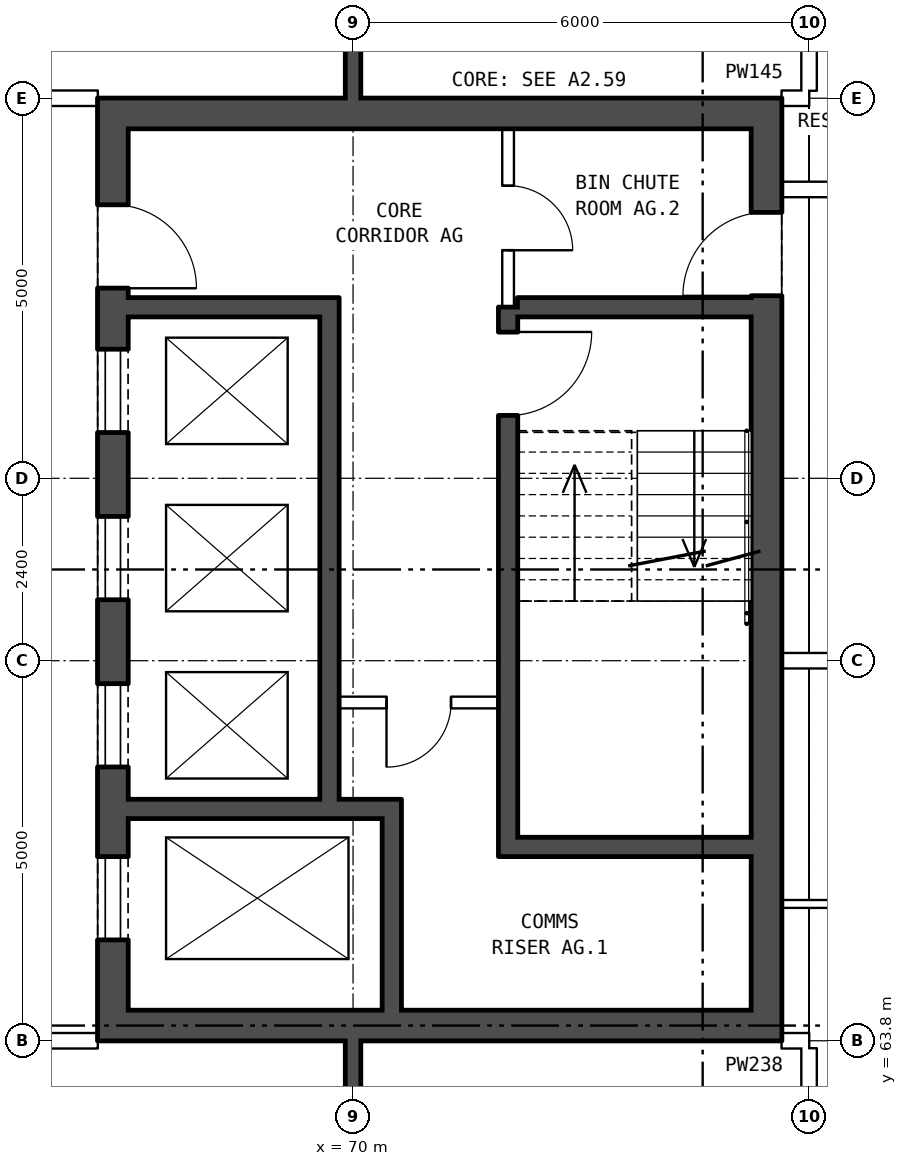
"""IFC4 building model, lengths in metres.
Left out: names, types, materials, properties, quantities, classifications, styles, units other than length and angle.
Written with IfcOpenShell. Run it as: python <this file> out.ifc"""

import sys

from ifc_helpers import new_model, si_unit, direction, frame, frame_2d, origin, place, context, subcontext, project, spatial, rectangle, extrude, element, fill, save


model = new_model("IFC4")
c1 = context("Model", 3, precision=1e-05, world=origin(), true_north=direction((0.0, 1.0)))
c2 = subcontext(c1, "Body", "Model", "MODEL_VIEW")
j1 = project(units=[si_unit("LENGTHUNIT", "METRE"), si_unit("PLANEANGLEUNIT", "RADIAN")], contexts=[c1])
p1 = place(None, origin())
s1 = spatial("IfcSite", under=j1, at=p1, CompositionType="ELEMENT")
p2 = place(p1, origin())
s2 = spatial("IfcBuilding", under=s1, at=p2, CompositionType="ELEMENT")
p3 = place(p2, frame((0.0, 0.0, 205.9)))
s3 = spatial("IfcBuildingStorey", under=s2, at=p3, CompositionType="ELEMENT", Elevation=205.9)
p4 = place(p3, frame((66.84, 63.8, 0.0), z_axis=(0.0, 0.0, 1.0), x_axis=(0.0, 1.0, 0.0)))
e1 = element("IfcWall", 1, at=p4, inside=s3, PredefinedType="SHEAR", context=c2, shape_type="SweptSolid", body=[
    extrude(rectangle(XDim=12.4, YDim=0.4, at=frame_2d((6.2, 0.0))), origin(), (0.0, 0.0, 1.0), 2.85),
])
p5 = place(p4, frame((1.325, 0.0, 0.0)))
e2 = element("IfcOpeningElement", 2, at=p5, cuts=e1, PredefinedType="OPENING", context=c2, shape_type="SweptSolid", body=[
    extrude(rectangle(XDim=1.1, YDim=2.1, at=frame_2d((0.55, 1.05))), frame((0.0, 0.21, 0.0), z_axis=(0.0, -1.0, 0.0), x_axis=(1.0, 0.0, 0.0)), (0.0, 0.0, 1.0), 0.42),
])
p6 = place(p4, frame((3.6, 0.0, 0.0)))
e3 = element("IfcOpeningElement", 3, at=p6, cuts=e1, PredefinedType="OPENING", context=c2, shape_type="SweptSolid", body=[
    extrude(rectangle(XDim=1.1, YDim=2.1, at=frame_2d((0.55, 1.05))), frame((0.0, 0.21, 0.0), z_axis=(0.0, -1.0, 0.0), x_axis=(1.0, 0.0, 0.0)), (0.0, 0.0, 1.0), 0.42),
])
p7 = place(p4, frame((5.8, 0.0, 0.0)))
e4 = element("IfcOpeningElement", 4, at=p7, cuts=e1, PredefinedType="OPENING", context=c2, shape_type="SweptSolid", body=[
    extrude(rectangle(XDim=1.1, YDim=2.1, at=frame_2d((0.55, 1.05))), frame((0.0, 0.21, 0.0), z_axis=(0.0, -1.0, 0.0), x_axis=(1.0, 0.0, 0.0)), (0.0, 0.0, 1.0), 0.42),
])
p8 = place(p4, frame((8.0, 0.0, 0.0)))
e5 = element("IfcOpeningElement", 5, at=p8, cuts=e1, PredefinedType="OPENING", context=c2, shape_type="SweptSolid", body=[
    extrude(rectangle(XDim=1.1, YDim=2.1, at=frame_2d((0.55, 1.05))), frame((0.0, 0.21, 0.0), z_axis=(0.0, -1.0, 0.0), x_axis=(1.0, 0.0, 0.0)), (0.0, 0.0, 1.0), 0.42),
])
p9 = place(p4, frame((9.9, 0.0, 0.0)))
e6 = element("IfcOpeningElement", 6, at=p9, cuts=e1, PredefinedType="OPENING", context=c2, shape_type="SweptSolid", body=[
    extrude(rectangle(XDim=1.1, YDim=2.1, at=frame_2d((0.55, 1.05))), frame((0.0, 0.21, 0.0), z_axis=(0.0, -1.0, 0.0), x_axis=(1.0, 0.0, 0.0)), (0.0, 0.0, 1.0), 0.42),
])
p10 = place(p3, frame((75.44, 63.8, 0.0), z_axis=(0.0, 0.0, 1.0), x_axis=(0.0, 1.0, 0.0)))
e7 = element("IfcWall", 7, at=p10, inside=s3, PredefinedType="SHEAR", context=c2, shape_type="SweptSolid", body=[
    extrude(rectangle(XDim=12.4, YDim=0.4, at=frame_2d((6.2, 0.0))), origin(), (0.0, 0.0, 1.0), 2.85),
])
p11 = place(p10, frame((9.8, 0.0, 0.0)))
e8 = element("IfcOpeningElement", 8, at=p11, cuts=e7, PredefinedType="OPENING", context=c2, shape_type="SweptSolid", body=[
    extrude(rectangle(XDim=1.1, YDim=2.1, at=frame_2d((0.55, 1.05))), frame((0.0, 0.21, 0.0), z_axis=(0.0, -1.0, 0.0), x_axis=(1.0, 0.0, 0.0)), (0.0, 0.0, 1.0), 0.42),
])
for number, where, z_axis, x_axis in (
    (9, (67.04, 64.0, 0.0), (0.0, 0.0, 1.0), (1.0, 0.0, 0.0)),
    (10, (67.04, 76.0, 0.0), (0.0, 0.0, 1.0), (1.0, 0.0, 0.0)),
):
    element("IfcWall", number, at=place(p3, frame(where, z_axis=z_axis, x_axis=x_axis)), inside=s3, PredefinedType="SHEAR", context=c2, shape_type="SweptSolid", body=[
        extrude(rectangle(XDim=8.2, YDim=0.4, at=frame_2d((4.1, 0.0))), origin(), (0.0, 0.0, 1.0), 2.85),
    ])
p12 = place(p3, frame((72.165, 66.35, 0.0), z_axis=(0.0, 0.0, 1.0), x_axis=(1.0, 0.0, 0.0)))
e11 = element("IfcWall", 11, at=p12, inside=s3, PredefinedType="SHEAR", context=c2, shape_type="SweptSolid", body=[
    extrude(rectangle(XDim=3.075, YDim=0.25, at=frame_2d((1.538, 0.0))), origin(), (0.0, 0.0, 1.0), 2.85),
])
p13 = place(p3, frame((67.04, 66.85, 0.0), z_axis=(0.0, 0.0, 1.0), x_axis=(1.0, 0.0, 0.0)))
e12 = element("IfcWall", 12, at=p13, inside=s3, PredefinedType="SHEAR", context=c2, shape_type="SweptSolid", body=[
    extrude(rectangle(XDim=3.595, YDim=0.25, at=frame_2d((1.797, 0.0))), origin(), (0.0, 0.0, 1.0), 2.85),
])
p14 = place(p3, frame((69.815, 68.25, 0.0), z_axis=(0.0, 0.0, 1.0), x_axis=(1.0, 0.0, 0.0)))
e13 = element("IfcWall", 13, at=p14, inside=s3, PredefinedType="PARTITIONING", context=c2, shape_type="SweptSolid", body=[
    extrude(rectangle(XDim=2.1, YDim=0.15, at=frame_2d((1.05, 0.0))), origin(), (0.0, 0.0, 1.0), 2.85),
])
p15 = place(p14, frame((0.625, 0.0, 0.0)))
e14 = element("IfcOpeningElement", 14, at=p15, cuts=e13, PredefinedType="OPENING", context=c2, shape_type="SweptSolid", body=[
    extrude(rectangle(XDim=0.85, YDim=2.1, at=frame_2d((0.425, 1.05))), frame((0.0, 0.085, 0.0), z_axis=(0.0, -1.0, 0.0), x_axis=(1.0, 0.0, 0.0)), (0.0, 0.0, 1.0), 0.17),
])
p16 = place(p3, frame((67.04, 73.45, 0.0), z_axis=(0.0, 0.0, 1.0), x_axis=(1.0, 0.0, 0.0)))
e15 = element("IfcWall", 15, at=p16, inside=s3, PredefinedType="SHEAR", context=c2, shape_type="SweptSolid", body=[
    extrude(rectangle(XDim=2.525, YDim=0.25, at=frame_2d((1.262, 0.0))), origin(), (0.0, 0.0, 1.0), 2.85),
])
p17 = place(p3, frame((72.165, 73.45, 0.0), z_axis=(0.0, 0.0, 1.0), x_axis=(1.0, 0.0, 0.0)))
e16 = element("IfcWall", 16, at=p17, inside=s3, PredefinedType="SHEAR", context=c2, shape_type="SweptSolid", body=[
    extrude(rectangle(XDim=3.075, YDim=0.25, at=frame_2d((1.538, 0.0))), origin(), (0.0, 0.0, 1.0), 2.85),
])
p18 = place(p3, frame((69.69, 66.975, 0.0), z_axis=(0.0, 0.0, 1.0), x_axis=(0.0, 1.0, 0.0)))
e17 = element("IfcWall", 17, at=p18, inside=s3, PredefinedType="SHEAR", context=c2, shape_type="SweptSolid", body=[
    extrude(rectangle(XDim=6.6, YDim=0.25, at=frame_2d((3.3, 0.0))), origin(), (0.0, 0.0, 1.0), 2.85),
])
p19 = place(p3, frame((70.51, 64.2, 0.0), z_axis=(0.0, 0.0, 1.0), x_axis=(0.0, 1.0, 0.0)))
e18 = element("IfcWall", 18, at=p19, inside=s3, PredefinedType="SHEAR", context=c2, shape_type="SweptSolid", body=[
    extrude(rectangle(XDim=2.525, YDim=0.25, at=frame_2d((1.263, 0.0))), origin(), (0.0, 0.0, 1.0), 2.85),
])
p20 = place(p3, frame((72.04, 66.225, 0.0), z_axis=(0.0, 0.0, 1.0), x_axis=(0.0, 1.0, 0.0)))
e19 = element("IfcWall", 19, at=p20, inside=s3, PredefinedType="SHEAR", context=c2, shape_type="SweptSolid", body=[
    extrude(rectangle(XDim=7.225, YDim=0.25, at=frame_2d((3.612, 0.0))), origin(), (0.0, 0.0, 1.0), 2.85),
])
p21 = place(p20, frame((5.8, 0.0, 0.0)))
e20 = element("IfcOpeningElement", 20, at=p21, cuts=e19, PredefinedType="OPENING", context=c2, shape_type="SweptSolid", body=[
    extrude(rectangle(XDim=1.1, YDim=2.1, at=frame_2d((0.55, 1.05))), frame((0.0, 0.135, 0.0), z_axis=(0.0, -1.0, 0.0), x_axis=(1.0, 0.0, 0.0)), (0.0, 0.0, 1.0), 0.27),
])
p22 = place(p3, frame((72.04, 73.45, 0.0), z_axis=(0.0, 0.0, 1.0), x_axis=(0.0, 1.0, 0.0)))
e21 = element("IfcWall", 21, at=p22, inside=s3, PredefinedType="PARTITIONING", context=c2, shape_type="SweptSolid", body=[
    extrude(rectangle(XDim=2.35, YDim=0.15, at=frame_2d((1.175, 0.0))), origin(), (0.0, 0.0, 1.0), 2.85),
])
p23 = place(p22, frame((0.75, 0.0, 0.0)))
e22 = element("IfcOpeningElement", 22, at=p23, cuts=e21, PredefinedType="OPENING", context=c2, shape_type="SweptSolid", body=[
    extrude(rectangle(XDim=0.85, YDim=2.1, at=frame_2d((0.425, 1.05))), frame((0.0, 0.085, 0.0), z_axis=(0.0, -1.0, 0.0), x_axis=(1.0, 0.0, 0.0)), (0.0, 0.0, 1.0), 0.17),
])
p24 = place(p3, frame((63.64, 63.8, 0.0), z_axis=(0.0, 0.0, 1.0), x_axis=(1.0, 0.0, 0.0)))
e23 = element("IfcWall", 23, at=p24, inside=s3, PredefinedType="PARTITIONING", context=c2, shape_type="SweptSolid", body=[
    extrude(rectangle(XDim=3.0, YDim=0.2, at=frame_2d((1.5, 0.0))), origin(), (0.0, 0.0, 1.0), 2.85),
])
p25 = place(p24, frame((1.18, 0.0, 0.0)))
e24 = element("IfcOpeningElement", 24, at=p25, cuts=e23, PredefinedType="OPENING", context=c2, shape_type="SweptSolid", body=[
    extrude(rectangle(XDim=1.0, YDim=2.1, at=frame_2d((0.5, 1.05))), frame((0.0, 0.11, 0.0), z_axis=(0.0, -1.0, 0.0), x_axis=(1.0, 0.0, 0.0)), (0.0, 0.0, 1.0), 0.22),
])
p26 = place(p3, frame((75.64, 63.8, 0.0), z_axis=(0.0, 0.0, 1.0), x_axis=(1.0, 0.0, 0.0)))
e25 = element("IfcWall", 25, at=p26, inside=s3, PredefinedType="PARTITIONING", context=c2, shape_type="SweptSolid", body=[
    extrude(rectangle(XDim=0.36, YDim=0.2, at=frame_2d((0.18, 0.0))), origin(), (0.0, 0.0, 1.0), 2.85),
])
p27 = place(p3, frame((75.64, 65.6, 0.0), z_axis=(0.0, 0.0, 1.0), x_axis=(1.0, 0.0, 0.0)))
e26 = element("IfcWall", 26, at=p27, inside=s3, PredefinedType="PARTITIONING", context=c2, shape_type="SweptSolid", body=[
    extrude(rectangle(XDim=3.798, YDim=0.1, at=frame_2d((1.899, 0.0))), origin(), (0.0, 0.0, 1.0), 2.85),
])
p28 = place(p3, frame((75.64, 68.8, 0.0), z_axis=(0.0, 0.0, 1.0), x_axis=(1.0, 0.0, 0.0)))
e27 = element("IfcWall", 27, at=p28, inside=s3, PredefinedType="PARTITIONING", context=c2, shape_type="SweptSolid", body=[
    extrude(rectangle(XDim=55.72, YDim=0.2, at=frame_2d((27.86, 0.0))), origin(), (0.0, 0.0, 1.0), 2.85),
])
p29 = place(p28, frame((5.191, 0.0, 0.0)))
e28 = element("IfcOpeningElement", 28, at=p29, cuts=e27, PredefinedType="OPENING", context=c2, shape_type="SweptSolid", body=[
    extrude(rectangle(XDim=1.0, YDim=2.1, at=frame_2d((0.5, 1.05))), frame((0.0, 0.11, 0.0), z_axis=(0.0, -1.0, 0.0), x_axis=(1.0, 0.0, 0.0)), (0.0, 0.0, 1.0), 0.22),
])
p30 = place(p28, frame((12.241, 0.0, 0.0)))
e29 = element("IfcOpeningElement", 29, at=p30, cuts=e27, PredefinedType="OPENING", context=c2, shape_type="SweptSolid", body=[
    extrude(rectangle(XDim=1.0, YDim=2.1, at=frame_2d((0.5, 1.05))), frame((0.0, 0.11, 0.0), z_axis=(0.0, -1.0, 0.0), x_axis=(1.0, 0.0, 0.0)), (0.0, 0.0, 1.0), 0.22),
])
p31 = place(p28, frame((22.553, 0.0, 0.0)))
e30 = element("IfcOpeningElement", 30, at=p31, cuts=e27, PredefinedType="OPENING", context=c2, shape_type="SweptSolid", body=[
    extrude(rectangle(XDim=1.0, YDim=2.1, at=frame_2d((0.5, 1.05))), frame((0.0, 0.11, 0.0), z_axis=(0.0, -1.0, 0.0), x_axis=(1.0, 0.0, 0.0)), (0.0, 0.0, 1.0), 0.22),
])
p32 = place(p28, frame((32.866, 0.0, 0.0)))
e31 = element("IfcOpeningElement", 31, at=p32, cuts=e27, PredefinedType="OPENING", context=c2, shape_type="SweptSolid", body=[
    extrude(rectangle(XDim=1.0, YDim=2.1, at=frame_2d((0.5, 1.05))), frame((0.0, 0.11, 0.0), z_axis=(0.0, -1.0, 0.0), x_axis=(1.0, 0.0, 0.0)), (0.0, 0.0, 1.0), 0.22),
])
p33 = place(p28, frame((36.303, 0.0, 0.0)))
e32 = element("IfcOpeningElement", 32, at=p33, cuts=e27, PredefinedType="OPENING", context=c2, shape_type="SweptSolid", body=[
    extrude(rectangle(XDim=1.0, YDim=2.1, at=frame_2d((0.5, 1.05))), frame((0.0, 0.11, 0.0), z_axis=(0.0, -1.0, 0.0), x_axis=(1.0, 0.0, 0.0)), (0.0, 0.0, 1.0), 0.22),
])
p34 = place(p28, frame((43.178, 0.0, 0.0)))
e33 = element("IfcOpeningElement", 33, at=p34, cuts=e27, PredefinedType="OPENING", context=c2, shape_type="SweptSolid", body=[
    extrude(rectangle(XDim=1.0, YDim=2.1, at=frame_2d((0.5, 1.05))), frame((0.0, 0.11, 0.0), z_axis=(0.0, -1.0, 0.0), x_axis=(1.0, 0.0, 0.0)), (0.0, 0.0, 1.0), 0.22),
])
p35 = place(p28, frame((50.053, 0.0, 0.0)))
e34 = element("IfcOpeningElement", 34, at=p35, cuts=e27, PredefinedType="OPENING", context=c2, shape_type="SweptSolid", body=[
    extrude(rectangle(XDim=1.0, YDim=2.1, at=frame_2d((0.5, 1.05))), frame((0.0, 0.11, 0.0), z_axis=(0.0, -1.0, 0.0), x_axis=(1.0, 0.0, 0.0)), (0.0, 0.0, 1.0), 0.22),
])
p36 = place(p3, frame((75.64, 75.0, 0.0), z_axis=(0.0, 0.0, 1.0), x_axis=(1.0, 0.0, 0.0)))
e35 = element("IfcWall", 35, at=p36, inside=s3, PredefinedType="PARTITIONING", context=c2, shape_type="SweptSolid", body=[
    extrude(rectangle(XDim=7.585, YDim=0.2, at=frame_2d((3.792, 0.0))), origin(), (0.0, 0.0, 1.0), 2.85),
])
p37 = place(p36, frame((3.343, 0.0, 0.0)))
e36 = element("IfcOpeningElement", 36, at=p37, cuts=e35, PredefinedType="OPENING", context=c2, shape_type="SweptSolid", body=[
    extrude(rectangle(XDim=0.9, YDim=2.1, at=frame_2d((0.45, 1.05))), frame((0.0, 0.11, 0.0), z_axis=(0.0, -1.0, 0.0), x_axis=(1.0, 0.0, 0.0)), (0.0, 0.0, 1.0), 0.22),
])
p38 = place(p3, frame((63.64, 76.2, 0.0), z_axis=(0.0, 0.0, 1.0), x_axis=(1.0, 0.0, 0.0)))
e37 = element("IfcWall", 37, at=p38, inside=s3, PredefinedType="PARTITIONING", context=c2, shape_type="SweptSolid", body=[
    extrude(rectangle(XDim=3.0, YDim=0.2, at=frame_2d((1.5, 0.0))), origin(), (0.0, 0.0, 1.0), 2.85),
])
p39 = place(p38, frame((1.18, 0.0, 0.0)))
e38 = element("IfcOpeningElement", 38, at=p39, cuts=e37, PredefinedType="OPENING", context=c2, shape_type="SweptSolid", body=[
    extrude(rectangle(XDim=1.0, YDim=2.1, at=frame_2d((0.5, 1.05))), frame((0.0, 0.11, 0.0), z_axis=(0.0, -1.0, 0.0), x_axis=(1.0, 0.0, 0.0)), (0.0, 0.0, 1.0), 0.22),
])
p40 = place(p3, frame((75.64, 76.2, 0.0), z_axis=(0.0, 0.0, 1.0), x_axis=(1.0, 0.0, 0.0)))
e39 = element("IfcWall", 39, at=p40, inside=s3, PredefinedType="PARTITIONING", context=c2, shape_type="SweptSolid", body=[
    extrude(rectangle(XDim=0.36, YDim=0.2, at=frame_2d((0.18, 0.0))), origin(), (0.0, 0.0, 1.0), 2.85),
])
p41 = place(p3, frame((70.0, 54.36, 0.0), z_axis=(0.0, 0.0, 1.0), x_axis=(0.0, 1.0, 0.0)))
e40 = element("IfcWall", 40, at=p41, inside=s3, PredefinedType="SOLIDWALL", context=c2, shape_type="SweptSolid", body=[
    extrude(rectangle(XDim=9.44, YDim=0.2, at=frame_2d((4.72, 0.0))), origin(), (0.0, 0.0, 1.0), 2.85),
])
p42 = place(p41, frame((2.32, 0.0, 0.0)))
e41 = element("IfcOpeningElement", 41, at=p42, cuts=e40, PredefinedType="OPENING", context=c2, shape_type="SweptSolid", body=[
    extrude(rectangle(XDim=0.9, YDim=2.1, at=frame_2d((0.45, 1.05))), frame((0.0, 0.11, 0.0), z_axis=(0.0, -1.0, 0.0), x_axis=(1.0, 0.0, 0.0)), (0.0, 0.0, 1.0), 0.22),
])
p43 = place(p41, frame((7.39, 0.0, 0.0)))
e42 = element("IfcOpeningElement", 42, at=p43, cuts=e40, PredefinedType="OPENING", context=c2, shape_type="SweptSolid", body=[
    extrude(rectangle(XDim=0.8, YDim=2.1, at=frame_2d((0.4, 1.05))), frame((0.0, 0.11, 0.0), z_axis=(0.0, -1.0, 0.0), x_axis=(1.0, 0.0, 0.0)), (0.0, 0.0, 1.0), 0.22),
])
p44 = place(p3, frame((70.0, 76.2, 0.0), z_axis=(0.0, 0.0, 1.0), x_axis=(0.0, 1.0, 0.0)))
e43 = element("IfcWall", 43, at=p44, inside=s3, PredefinedType="SOLIDWALL", context=c2, shape_type="SweptSolid", body=[
    extrude(rectangle(XDim=9.44, YDim=0.2, at=frame_2d((4.72, 0.0))), origin(), (0.0, 0.0, 1.0), 2.85),
])
p45 = place(p44, frame((5.92, 0.0, 0.0)))
e44 = element("IfcOpeningElement", 44, at=p45, cuts=e43, PredefinedType="OPENING", context=c2, shape_type="SweptSolid", body=[
    extrude(rectangle(XDim=0.9, YDim=2.1, at=frame_2d((0.45, 1.05))), frame((0.0, 0.11, 0.0), z_axis=(0.0, -1.0, 0.0), x_axis=(1.0, 0.0, 0.0)), (0.0, 0.0, 1.0), 0.22),
])
p46 = place(p44, frame((1.25, 0.0, 0.0)))
e45 = element("IfcOpeningElement", 45, at=p46, cuts=e43, PredefinedType="OPENING", context=c2, shape_type="SweptSolid", body=[
    extrude(rectangle(XDim=0.8, YDim=2.1, at=frame_2d((0.4, 1.05))), frame((0.0, 0.11, 0.0), z_axis=(0.0, -1.0, 0.0), x_axis=(1.0, 0.0, 0.0)), (0.0, 0.0, 1.0), 0.22),
])
for number, where, z_axis, x_axis in (
    (46, (76.0, 54.36, 0.0), (0.0, 0.0, 1.0), (0.0, 1.0, 0.0)),
    (47, (76.0, 76.3, 0.0), (0.0, 0.0, 1.0), (0.0, 1.0, 0.0)),
):
    element("IfcWall", number, at=place(p3, frame(where, z_axis=z_axis, x_axis=x_axis)), inside=s3, PredefinedType="PARTITIONING", context=c2, shape_type="SweptSolid", body=[
        extrude(rectangle(XDim=9.34, YDim=0.2, at=frame_2d((4.67, 0.0))), origin(), (0.0, 0.0, 1.0), 2.85),
    ])
p47 = place(p5, origin())
e48 = element("IfcDoor", 48, at=p47, inside=s3, OperationType="DOUBLE_DOOR_SLIDING", PredefinedType="DOOR", context=c2, shape_type="SweptSolid", body=[
    extrude(rectangle(XDim=1.1, YDim=2.1, at=frame_2d((0.55, 1.05))), frame((0.0, -0.135, 0.0), z_axis=(0.0, -1.0, 0.0), x_axis=(1.0, 0.0, 0.0)), (0.0, 0.0, 1.0), 0.05),
])
fill(e2, e48)
p48 = place(p6, origin())
e49 = element("IfcDoor", 49, at=p48, inside=s3, OperationType="DOUBLE_DOOR_SLIDING", PredefinedType="DOOR", context=c2, shape_type="SweptSolid", body=[
    extrude(rectangle(XDim=1.1, YDim=2.1, at=frame_2d((0.55, 1.05))), frame((0.0, -0.135, 0.0), z_axis=(0.0, -1.0, 0.0), x_axis=(1.0, 0.0, 0.0)), (0.0, 0.0, 1.0), 0.05),
])
fill(e3, e49)
p49 = place(p7, origin())
e50 = element("IfcDoor", 50, at=p49, inside=s3, OperationType="DOUBLE_DOOR_SLIDING", PredefinedType="DOOR", context=c2, shape_type="SweptSolid", body=[
    extrude(rectangle(XDim=1.1, YDim=2.1, at=frame_2d((0.55, 1.05))), frame((0.0, -0.135, 0.0), z_axis=(0.0, -1.0, 0.0), x_axis=(1.0, 0.0, 0.0)), (0.0, 0.0, 1.0), 0.05),
])
fill(e4, e50)
p50 = place(p8, origin())
e51 = element("IfcDoor", 51, at=p50, inside=s3, OperationType="DOUBLE_DOOR_SLIDING", PredefinedType="DOOR", context=c2, shape_type="SweptSolid", body=[
    extrude(rectangle(XDim=1.1, YDim=2.1, at=frame_2d((0.55, 1.05))), frame((0.0, -0.135, 0.0), z_axis=(0.0, -1.0, 0.0), x_axis=(1.0, 0.0, 0.0)), (0.0, 0.0, 1.0), 0.05),
])
fill(e5, e51)
p51 = place(p9, frame((1.1, 0.0, 0.0), z_axis=(0.0, 0.0, 1.0), x_axis=(-1.0, 0.0, 0.0)))
e52 = element("IfcDoor", 52, at=p51, inside=s3, OperationType="SINGLE_SWING_RIGHT", PredefinedType="DOOR", context=c2, shape_type="SweptSolid", body=[
    extrude(rectangle(XDim=1.1, YDim=2.1, at=frame_2d((0.55, 1.05))), frame((0.0, 0.185, 0.0), z_axis=(0.0, -1.0, 0.0), x_axis=(1.0, 0.0, 0.0)), (0.0, 0.0, 1.0), 0.05),
])
fill(e6, e52)
p52 = place(p21, frame((1.1, 0.0, 0.0), z_axis=(0.0, 0.0, 1.0), x_axis=(-1.0, 0.0, 0.0)))
e53 = element("IfcDoor", 53, at=p52, inside=s3, OperationType="SINGLE_SWING_LEFT", PredefinedType="DOOR", context=c2, shape_type="SweptSolid", body=[
    extrude(rectangle(XDim=1.1, YDim=2.1, at=frame_2d((0.55, 1.05))), frame((0.0, 0.025, 0.0), z_axis=(0.0, -1.0, 0.0), x_axis=(1.0, 0.0, 0.0)), (0.0, 0.0, 1.0), 0.05),
])
fill(e20, e53)
p53 = place(p15, frame((0.85, 0.0, 0.0), z_axis=(0.0, 0.0, 1.0), x_axis=(-1.0, 0.0, 0.0)))
e54 = element("IfcDoor", 54, at=p53, inside=s3, OperationType="SINGLE_SWING_RIGHT", PredefinedType="DOOR", context=c2, shape_type="SweptSolid", body=[
    extrude(rectangle(XDim=0.85, YDim=2.1, at=frame_2d((0.425, 1.05))), frame((0.0, 0.025, 0.0), z_axis=(0.0, -1.0, 0.0), x_axis=(1.0, 0.0, 0.0)), (0.0, 0.0, 1.0), 0.05),
])
fill(e14, e54)
p54 = place(p23, frame((0.85, 0.0, 0.0), z_axis=(0.0, 0.0, 1.0), x_axis=(-1.0, 0.0, 0.0)))
e55 = element("IfcDoor", 55, at=p54, inside=s3, OperationType="SINGLE_SWING_RIGHT", PredefinedType="DOOR", context=c2, shape_type="SweptSolid", body=[
    extrude(rectangle(XDim=0.85, YDim=2.1, at=frame_2d((0.425, 1.05))), frame((0.0, 0.025, 0.0), z_axis=(0.0, -1.0, 0.0), x_axis=(1.0, 0.0, 0.0)), (0.0, 0.0, 1.0), 0.05),
])
fill(e22, e55)
p55 = place(p11, origin())
e56 = element("IfcDoor", 56, at=p55, inside=s3, OperationType="SINGLE_SWING_LEFT", PredefinedType="DOOR", context=c2, shape_type="SweptSolid", body=[
    extrude(rectangle(XDim=1.1, YDim=2.1, at=frame_2d((0.55, 1.05))), frame((0.0, 0.185, 0.0), z_axis=(0.0, -1.0, 0.0), x_axis=(1.0, 0.0, 0.0)), (0.0, 0.0, 1.0), 0.05),
])
fill(e8, e56)
save(model, sys.argv[1])
